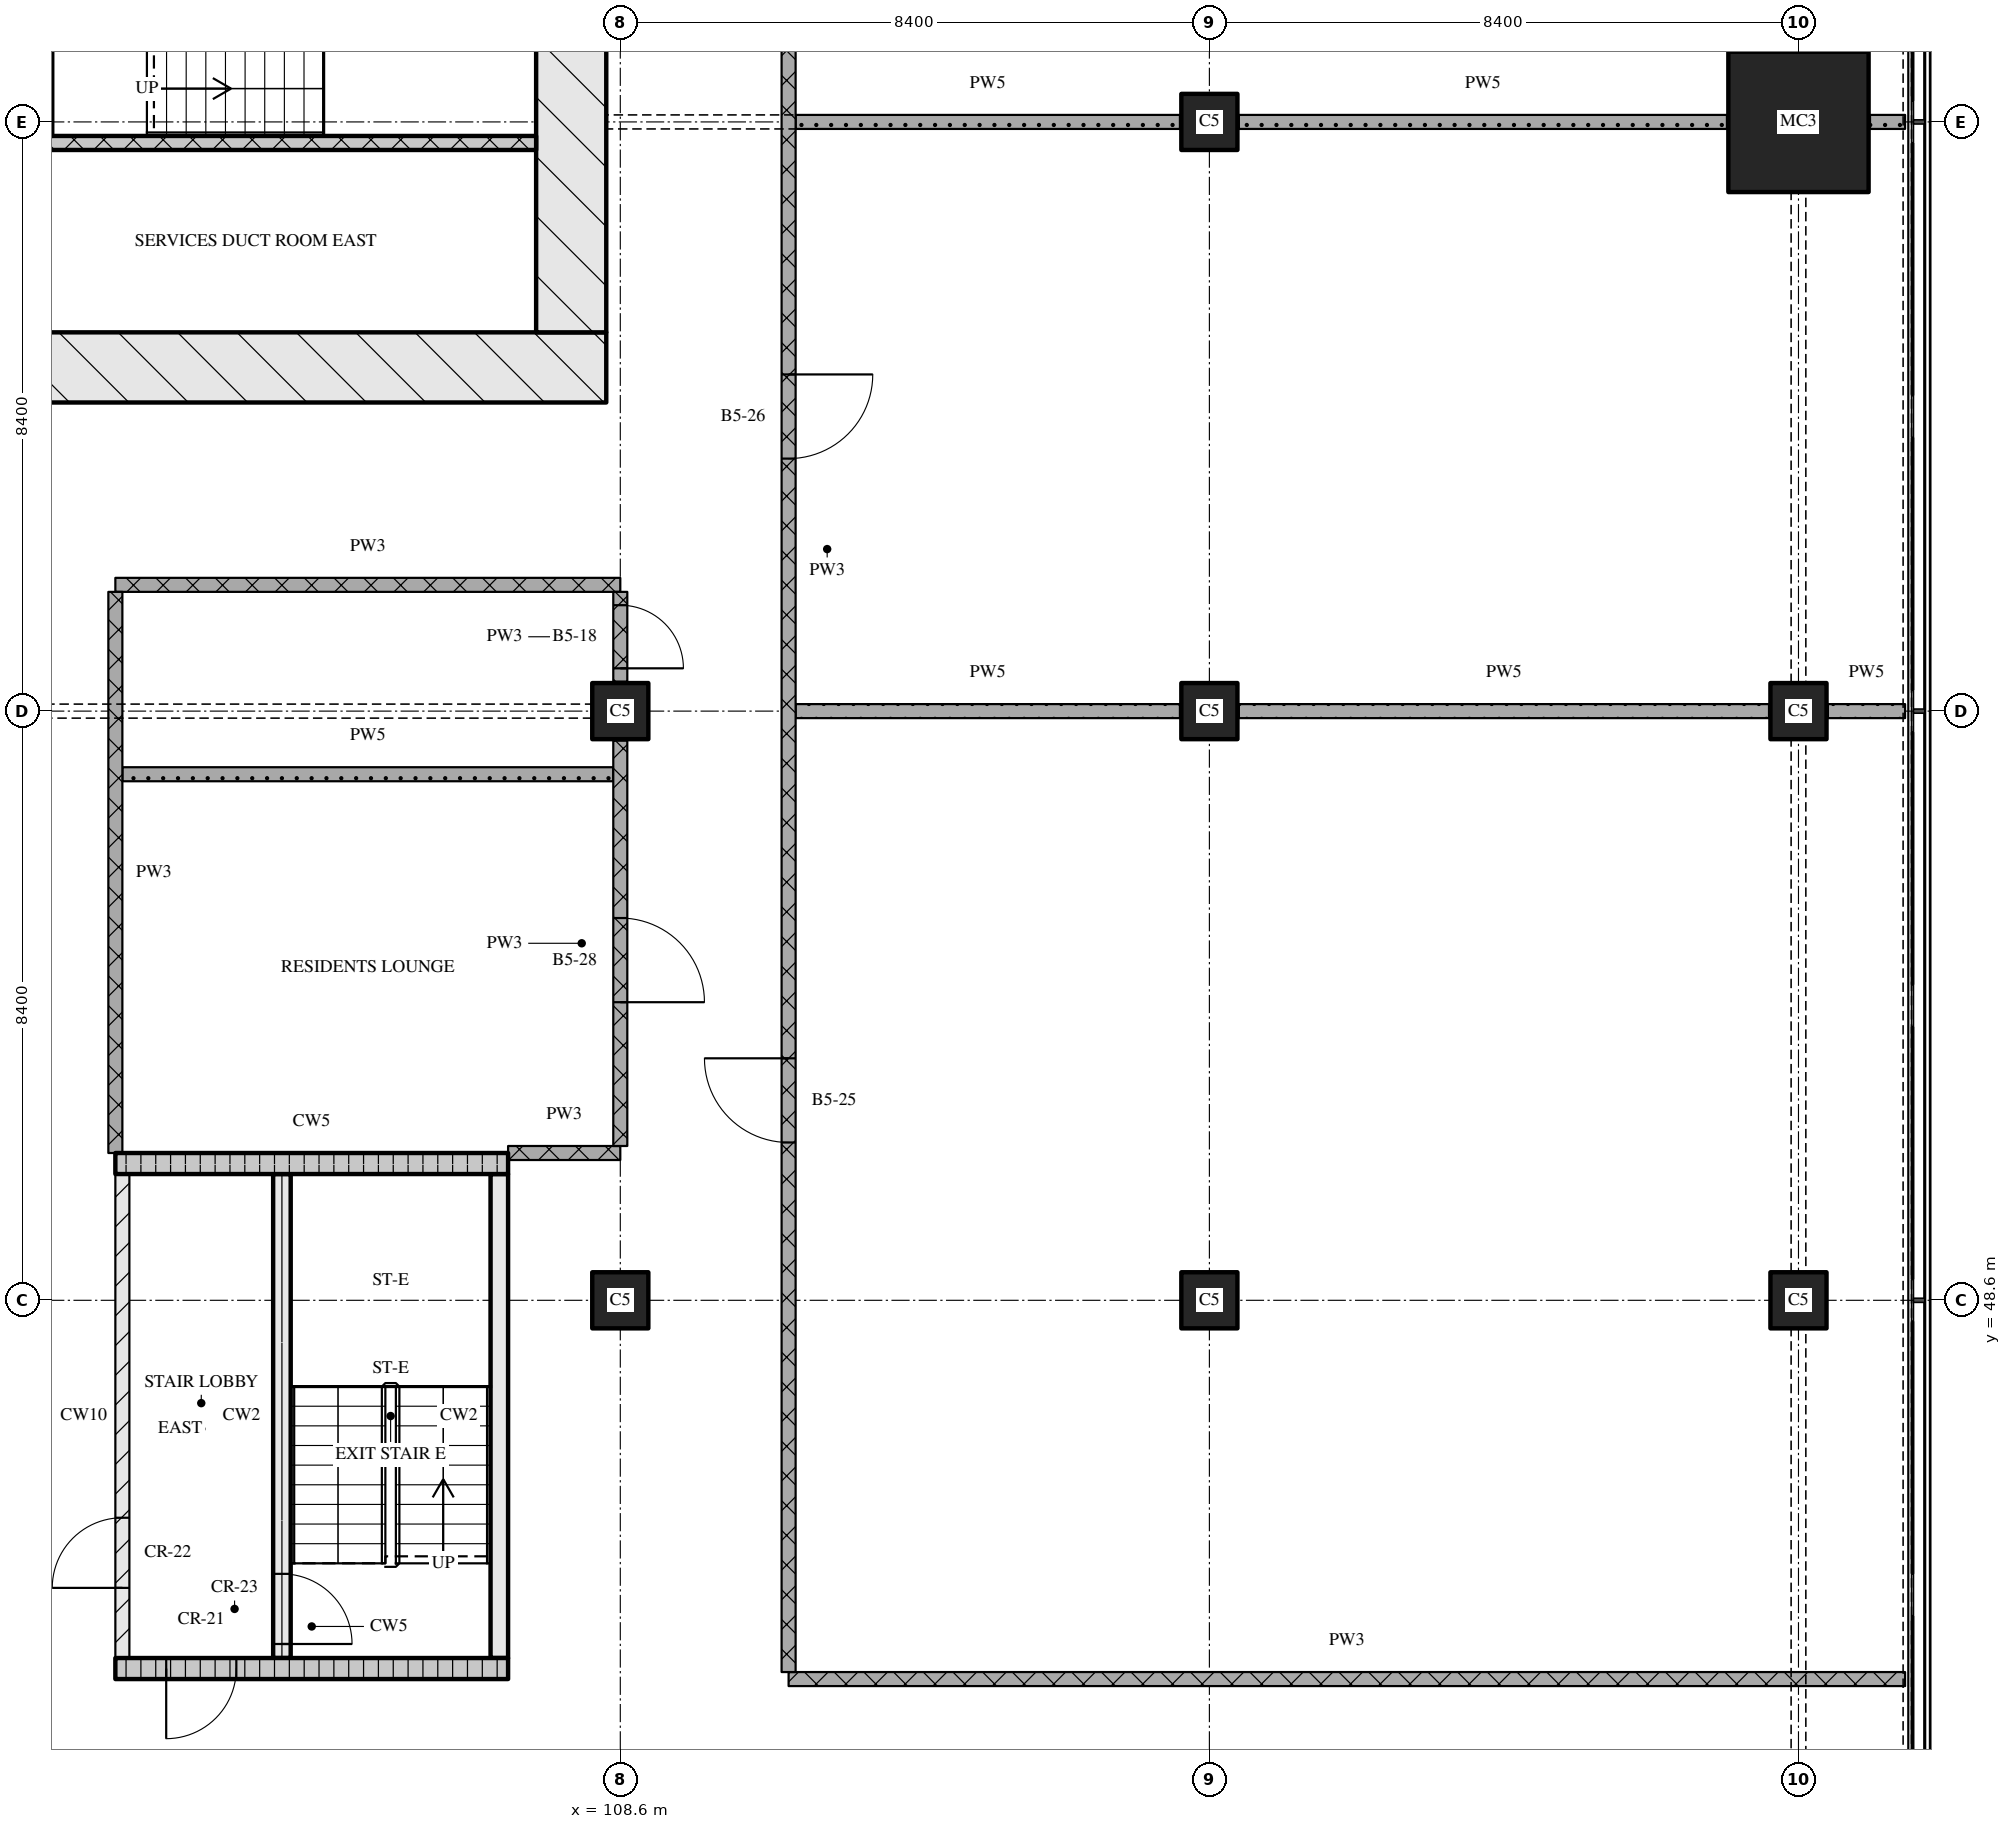
"""IFC4 building model, lengths in metres.
Left out: names, types, materials, properties, quantities, classifications, styles, units other than length and angle.
Written with IfcOpenShell. Run it as: python <this file> out.ifc"""

import sys

from ifc_helpers import new_model, si_unit, direction, frame, frame_2d, origin, origin_2d, place, context, subcontext, project, spatial, rectangle, extrude, element, fill, save


model = new_model("IFC4")
c1 = context("Model", 3, precision=1e-05, world=origin(), true_north=direction((0.0, 1.0)))
c2 = subcontext(c1, "Body", "Model", "MODEL_VIEW")
j1 = project(units=[si_unit("LENGTHUNIT", "METRE"), si_unit("PLANEANGLEUNIT", "RADIAN")], contexts=[c1])
p1 = place(None, origin())
s1 = spatial("IfcSite", under=j1, at=p1, CompositionType="ELEMENT")
p2 = place(p1, origin())
s2 = spatial("IfcBuilding", under=s1, at=p2, CompositionType="ELEMENT")
p3 = place(p2, frame((0.0, 0.0, 138.45)))
s3 = spatial("IfcBuildingStorey", under=s2, at=p3, CompositionType="ELEMENT", Elevation=138.45)
for number, where, z_axis, x_axis in (
    (1, (108.6, 48.6, 0.0), (0.0, 0.0, 1.0), (1.0, 0.0, 0.0)),
    (2, (108.6, 57.0, 0.0), (0.0, 0.0, 1.0), (1.0, 0.0, 0.0)),
    (3, (117.0, 48.6, 0.0), (0.0, 0.0, 1.0), (1.0, 0.0, 0.0)),
    (4, (117.0, 57.0, 0.0), (0.0, 0.0, 1.0), (1.0, 0.0, 0.0)),
    (5, (117.0, 65.4, 0.0), (0.0, 0.0, 1.0), (1.0, 0.0, 0.0)),
    (6, (125.4, 48.6, 0.0), (0.0, 0.0, 1.0), (1.0, 0.0, 0.0)),
    (7, (125.4, 57.0, 0.0), (0.0, 0.0, 1.0), (1.0, 0.0, 0.0)),
):
    element("IfcColumn", number, at=place(p3, frame(where, z_axis=z_axis, x_axis=x_axis)), inside=s3, PredefinedType="COLUMN", context=c2, shape_type="SweptSolid", body=[
        extrude(rectangle(XDim=0.8, YDim=0.8, at=origin_2d()), origin(), (0.0, 0.0, 1.0), 3.6),
    ])
p4 = place(p3, frame((125.4, 65.4, 0.0), z_axis=(0.0, 0.0, 1.0), x_axis=(1.0, 0.0, 0.0)))
e8 = element("IfcColumn", 8, at=p4, inside=s3, PredefinedType="COLUMN", context=c2, shape_type="SweptSolid", body=[
    extrude(rectangle(XDim=2.0, YDim=2.0, at=origin_2d()), origin(), (0.0, 0.0, 1.0), 3.6),
])
p5 = place(p3, frame((66.8, 61.9, 0.0), z_axis=(0.0, 0.0, 1.0), x_axis=(1.0, 0.0, 0.0)))
e9 = element("IfcWall", 9, at=p5, inside=s3, PredefinedType="SOLIDWALL", context=c2, shape_type="SweptSolid", body=[
    extrude(rectangle(XDim=41.6, YDim=1.0, at=frame_2d((20.8, 0.0))), origin(), (0.0, 0.0, 1.0), 3.3),
])
p6 = place(p5, frame((21.15, 0.0, 0.0)))
e10 = element("IfcOpeningElement", 10, at=p6, cuts=e9, PredefinedType="OPENING", context=c2, shape_type="SweptSolid", body=[
    extrude(rectangle(XDim=1.8, YDim=2.1, at=frame_2d((0.9, 1.05))), frame((0.0, 0.51, 0.0), z_axis=(0.0, -1.0, 0.0), x_axis=(1.0, 0.0, 0.0)), (0.0, 0.0, 1.0), 1.02),
])
p7 = place(p3, frame((107.9, 62.4, 0.0), z_axis=(0.0, 0.0, 1.0), x_axis=(0.0, 1.0, 0.0)))
e11 = element("IfcWall", 11, at=p7, inside=s3, PredefinedType="SOLIDWALL", context=c2, shape_type="SweptSolid", body=[
    extrude(rectangle(XDim=12.0, YDim=1.0, at=frame_2d((6.0, 0.0))), origin(), (0.0, 0.0, 1.0), 3.3),
])
p8 = place(p7, frame((6.45, 0.0, 0.0)))
e12 = element("IfcOpeningElement", 12, at=p8, cuts=e11, PredefinedType="OPENING", context=c2, shape_type="SweptSolid", body=[
    extrude(rectangle(XDim=1.2, YDim=2.1, at=frame_2d((0.6, 1.05))), frame((0.0, 0.51, 0.0), z_axis=(0.0, -1.0, 0.0), x_axis=(1.0, 0.0, 0.0)), (0.0, 0.0, 1.0), 1.02),
])
p9 = place(p3, frame((91.4, 65.1, 0.0), z_axis=(0.0, 0.0, 1.0), x_axis=(1.0, 0.0, 0.0)))
e13 = element("IfcWall", 13, at=p9, inside=s3, PredefinedType="SOLIDWALL", context=c2, shape_type="SweptSolid", body=[
    extrude(rectangle(XDim=16.0, YDim=0.2, at=frame_2d((8.0, 0.0))), origin(), (0.0, 0.0, 1.0), 3.3),
])
p10 = place(p9, frame((7.83, 0.0, 0.0)))
e14 = element("IfcOpeningElement", 14, at=p10, cuts=e13, PredefinedType="OPENING", context=c2, shape_type="SweptSolid", body=[
    extrude(rectangle(XDim=0.9, YDim=2.1, at=frame_2d((0.45, 1.05))), frame((0.0, 0.11, 0.0), z_axis=(0.0, -1.0, 0.0), x_axis=(1.0, 0.0, 0.0)), (0.0, 0.0, 1.0), 0.22),
])
p11 = place(p3, frame((100.35, 65.2, 0.0), z_axis=(0.0, 0.0, 1.0), x_axis=(0.0, 1.0, 0.0)))
e15 = element("IfcWall", 15, at=p11, inside=s3, PredefinedType="SOLIDWALL", context=c2, shape_type="SweptSolid", body=[
    extrude(rectangle(XDim=2.85, YDim=0.3, at=frame_2d((1.425, 0.0))), origin(), (0.0, 0.0, 1.0), 3.3),
])
p12 = place(p3, frame((101.4, 43.35, 0.0), z_axis=(0.0, 0.0, 1.0), x_axis=(1.0, 0.0, 0.0)))
e16 = element("IfcWall", 16, at=p12, inside=s3, PredefinedType="SOLIDWALL", context=c2, shape_type="SweptSolid", body=[
    extrude(rectangle(XDim=5.6, YDim=0.3, at=frame_2d((2.8, 0.0))), origin(), (0.0, 0.0, 1.0), 3.3),
])
p13 = place(p12, frame((0.725, 0.0, 0.0)))
e17 = element("IfcOpeningElement", 17, at=p13, cuts=e16, PredefinedType="OPENING", context=c2, shape_type="SweptSolid", body=[
    extrude(rectangle(XDim=1.0, YDim=2.1, at=frame_2d((0.5, 1.05))), frame((0.0, 0.16, 0.0), z_axis=(0.0, -1.0, 0.0), x_axis=(1.0, 0.0, 0.0)), (0.0, 0.0, 1.0), 0.32),
])
p14 = place(p3, frame((101.5, 43.5, 0.0), z_axis=(0.0, 0.0, 1.0), x_axis=(0.0, 1.0, 0.0)))
e18 = element("IfcWall", 18, at=p14, inside=s3, PredefinedType="PARTITIONING", context=c2, shape_type="SweptSolid", body=[
    extrude(rectangle(XDim=6.9, YDim=0.2, at=frame_2d((3.45, 0.0))), origin(), (0.0, 0.0, 1.0), 3.3),
])
p15 = place(p14, frame((1.0, 0.0, 0.0)))
e19 = element("IfcOpeningElement", 19, at=p15, cuts=e18, PredefinedType="OPENING", context=c2, shape_type="SweptSolid", body=[
    extrude(rectangle(XDim=1.0, YDim=2.1, at=frame_2d((0.5, 1.05))), frame((0.0, 0.11, 0.0), z_axis=(0.0, -1.0, 0.0), x_axis=(1.0, 0.0, 0.0)), (0.0, 0.0, 1.0), 0.22),
])
p16 = place(p3, frame((103.775, 43.5, 0.0), z_axis=(0.0, 0.0, 1.0), x_axis=(0.0, 1.0, 0.0)))
e20 = element("IfcWall", 20, at=p16, inside=s3, PredefinedType="SOLIDWALL", context=c2, shape_type="SweptSolid", body=[
    extrude(rectangle(XDim=6.9, YDim=0.25, at=frame_2d((3.45, 0.0))), origin(), (0.0, 0.0, 1.0), 3.3),
])
p17 = place(p16, frame((0.2, 0.0, 0.0)))
e21 = element("IfcOpeningElement", 21, at=p17, cuts=e20, PredefinedType="OPENING", context=c2, shape_type="SweptSolid", body=[
    extrude(rectangle(XDim=1.0, YDim=2.1, at=frame_2d((0.5, 1.05))), frame((0.0, 0.135, 0.0), z_axis=(0.0, -1.0, 0.0), x_axis=(1.0, 0.0, 0.0)), (0.0, 0.0, 1.0), 0.27),
])
p18 = place(p3, frame((106.875, 43.5, 0.0), z_axis=(0.0, 0.0, 1.0), x_axis=(0.0, 1.0, 0.0)))
e22 = element("IfcWall", 22, at=p18, inside=s3, PredefinedType="SOLIDWALL", context=c2, shape_type="SweptSolid", body=[
    extrude(rectangle(XDim=6.9, YDim=0.25, at=frame_2d((3.45, 0.0))), origin(), (0.0, 0.0, 1.0), 3.3),
])
p19 = place(p3, frame((101.4, 50.55, 0.0), z_axis=(0.0, 0.0, 1.0), x_axis=(1.0, 0.0, 0.0)))
e23 = element("IfcWall", 23, at=p19, inside=s3, PredefinedType="SOLIDWALL", context=c2, shape_type="SweptSolid", body=[
    extrude(rectangle(XDim=5.6, YDim=0.3, at=frame_2d((2.8, 0.0))), origin(), (0.0, 0.0, 1.0), 3.3),
])
p20 = place(p3, frame((111.0, 43.2, 0.0), z_axis=(0.0, 0.0, 1.0), x_axis=(1.0, 0.0, 0.0)))
e24 = element("IfcWall", 24, at=p20, inside=s3, PredefinedType="PARTITIONING", context=c2, shape_type="SweptSolid", body=[
    extrude(rectangle(XDim=15.92, YDim=0.2, at=frame_2d((7.96, 0.0))), origin(), (0.0, 0.0, 1.0), 3.3),
])
p21 = place(p3, frame((107.0, 50.7, 0.0), z_axis=(0.0, 0.0, 1.0), x_axis=(1.0, 0.0, 0.0)))
e25 = element("IfcWall", 25, at=p21, inside=s3, PredefinedType="PARTITIONING", context=c2, shape_type="SweptSolid", body=[
    extrude(rectangle(XDim=1.6, YDim=0.2, at=frame_2d((0.8, 0.0))), origin(), (0.0, 0.0, 1.0), 3.3),
])
p22 = place(p3, frame((101.5, 56.1, 0.0), z_axis=(0.0, 0.0, 1.0), x_axis=(1.0, 0.0, 0.0)))
e26 = element("IfcWall", 26, at=p22, inside=s3, PredefinedType="PARTITIONING", context=c2, shape_type="SweptSolid", body=[
    extrude(rectangle(XDim=7.0, YDim=0.2, at=frame_2d((3.5, 0.0))), origin(), (0.0, 0.0, 1.0), 3.3),
])
p23 = place(p3, frame((111.1, 57.0, 0.0), z_axis=(0.0, 0.0, 1.0), x_axis=(1.0, 0.0, 0.0)))
e27 = element("IfcWall", 27, at=p23, inside=s3, PredefinedType="PARTITIONING", context=c2, shape_type="SweptSolid", body=[
    extrude(rectangle(XDim=5.48, YDim=0.2, at=frame_2d((2.74, 0.0))), origin(), (0.0, 0.0, 1.0), 3.3),
])
p24 = place(p3, frame((117.42, 57.0, 0.0), z_axis=(0.0, 0.0, 1.0), x_axis=(1.0, 0.0, 0.0)))
e28 = element("IfcWall", 28, at=p24, inside=s3, PredefinedType="PARTITIONING", context=c2, shape_type="SweptSolid", body=[
    extrude(rectangle(XDim=7.56, YDim=0.2, at=frame_2d((3.78, 0.0))), origin(), (0.0, 0.0, 1.0), 3.3),
])
p25 = place(p3, frame((125.82, 57.0, 0.0), z_axis=(0.0, 0.0, 1.0), x_axis=(1.0, 0.0, 0.0)))
e29 = element("IfcWall", 29, at=p25, inside=s3, PredefinedType="PARTITIONING", context=c2, shape_type="SweptSolid", body=[
    extrude(rectangle(XDim=1.1, YDim=0.2, at=frame_2d((0.55, 0.0))), origin(), (0.0, 0.0, 1.0), 3.3),
])
p26 = place(p3, frame((101.4, 58.8, 0.0), z_axis=(0.0, 0.0, 1.0), x_axis=(1.0, 0.0, 0.0)))
e30 = element("IfcWall", 30, at=p26, inside=s3, PredefinedType="PARTITIONING", context=c2, shape_type="SweptSolid", body=[
    extrude(rectangle(XDim=7.2, YDim=0.2, at=frame_2d((3.6, 0.0))), origin(), (0.0, 0.0, 1.0), 3.3),
])
p27 = place(p3, frame((111.1, 65.4, 0.0), z_axis=(0.0, 0.0, 1.0), x_axis=(1.0, 0.0, 0.0)))
e31 = element("IfcWall", 31, at=p27, inside=s3, PredefinedType="PARTITIONING", context=c2, shape_type="SweptSolid", body=[
    extrude(rectangle(XDim=5.48, YDim=0.2, at=frame_2d((2.74, 0.0))), origin(), (0.0, 0.0, 1.0), 2.9),
])
p28 = place(p3, frame((117.42, 65.4, 0.0), z_axis=(0.0, 0.0, 1.0), x_axis=(1.0, 0.0, 0.0)))
e32 = element("IfcWall", 32, at=p28, inside=s3, PredefinedType="PARTITIONING", context=c2, shape_type="SweptSolid", body=[
    extrude(rectangle(XDim=6.96, YDim=0.2, at=frame_2d((3.48, 0.0))), origin(), (0.0, 0.0, 1.0), 3.3),
])
p29 = place(p3, frame((126.42, 65.4, 0.0), z_axis=(0.0, 0.0, 1.0), x_axis=(1.0, 0.0, 0.0)))
e33 = element("IfcWall", 33, at=p29, inside=s3, PredefinedType="PARTITIONING", context=c2, shape_type="SweptSolid", body=[
    extrude(rectangle(XDim=0.5, YDim=0.2, at=frame_2d((0.25, 0.0))), origin(), (0.0, 0.0, 1.0), 3.3),
])
p30 = place(p3, frame((101.4, 58.7, 0.0), z_axis=(0.0, 0.0, 1.0), x_axis=(0.0, -1.0, 0.0)))
e34 = element("IfcWall", 34, at=p30, inside=s3, PredefinedType="PARTITIONING", context=c2, shape_type="SweptSolid", body=[
    extrude(rectangle(XDim=8.0, YDim=0.2, at=frame_2d((4.0, 0.0))), origin(), (0.0, 0.0, 1.0), 3.3),
])
p31 = place(p3, frame((108.6, 50.8, 0.0), z_axis=(0.0, 0.0, 1.0), x_axis=(0.0, 1.0, 0.0)))
e35 = element("IfcWall", 35, at=p31, inside=s3, PredefinedType="PARTITIONING", context=c2, shape_type="SweptSolid", body=[
    extrude(rectangle(XDim=5.78, YDim=0.2, at=frame_2d((2.89, 0.0))), origin(), (0.0, 0.0, 1.0), 3.3),
])
p32 = place(p31, frame((2.05, 0.0, 0.0)))
e36 = element("IfcOpeningElement", 36, at=p32, cuts=e35, PredefinedType="OPENING", context=c2, shape_type="SweptSolid", body=[
    extrude(rectangle(XDim=1.2, YDim=2.1, at=frame_2d((0.6, 1.05))), frame((0.0, 0.11, 0.0), z_axis=(0.0, -1.0, 0.0), x_axis=(1.0, 0.0, 0.0)), (0.0, 0.0, 1.0), 0.22),
])
p33 = place(p3, frame((108.6, 57.42, 0.0), z_axis=(0.0, 0.0, 1.0), x_axis=(0.0, 1.0, 0.0)))
e37 = element("IfcWall", 37, at=p33, inside=s3, PredefinedType="PARTITIONING", context=c2, shape_type="SweptSolid", body=[
    extrude(rectangle(XDim=1.28, YDim=0.2, at=frame_2d((0.64, 0.0))), origin(), (0.0, 0.0, 1.0), 3.3),
])
p34 = place(p33, frame((0.19, 0.0, 0.0)))
e38 = element("IfcOpeningElement", 38, at=p34, cuts=e37, PredefinedType="OPENING", context=c2, shape_type="SweptSolid", body=[
    extrude(rectangle(XDim=0.9, YDim=2.1, at=frame_2d((0.45, 1.05))), frame((0.0, 0.11, 0.0), z_axis=(0.0, -1.0, 0.0), x_axis=(1.0, 0.0, 0.0)), (0.0, 0.0, 1.0), 0.22),
])
p35 = place(p3, frame((111.0, 75.32, 0.0), z_axis=(0.0, 0.0, 1.0), x_axis=(0.0, -1.0, 0.0)))
e39 = element("IfcWall", 39, at=p35, inside=s3, PredefinedType="PARTITIONING", context=c2, shape_type="SweptSolid", body=[
    extrude(rectangle(XDim=32.02, YDim=0.2, at=frame_2d((16.01, 0.0))), origin(), (0.0, 0.0, 1.0), 3.3),
])
p36 = place(p35, frame((4.579, 0.0, 0.0)))
e40 = element("IfcOpeningElement", 40, at=p36, cuts=e39, PredefinedType="OPENING", context=c2, shape_type="SweptSolid", body=[
    extrude(rectangle(XDim=1.2, YDim=2.1, at=frame_2d((0.6, 1.05))), frame((0.0, 0.11, 0.0), z_axis=(0.0, -1.0, 0.0), x_axis=(1.0, 0.0, 0.0)), (0.0, 0.0, 1.0), 0.22),
])
p37 = place(p35, frame((13.52, 0.0, 0.0)))
e41 = element("IfcOpeningElement", 41, at=p37, cuts=e39, PredefinedType="OPENING", context=c2, shape_type="SweptSolid", body=[
    extrude(rectangle(XDim=1.2, YDim=2.1, at=frame_2d((0.6, 1.05))), frame((0.0, 0.11, 0.0), z_axis=(0.0, -1.0, 0.0), x_axis=(1.0, 0.0, 0.0)), (0.0, 0.0, 1.0), 0.22),
])
p38 = place(p35, frame((23.27, 0.0, 0.0)))
e42 = element("IfcOpeningElement", 42, at=p38, cuts=e39, PredefinedType="OPENING", context=c2, shape_type="SweptSolid", body=[
    extrude(rectangle(XDim=1.2, YDim=2.1, at=frame_2d((0.6, 1.05))), frame((0.0, 0.11, 0.0), z_axis=(0.0, -1.0, 0.0), x_axis=(1.0, 0.0, 0.0)), (0.0, 0.0, 1.0), 0.22),
])
p39 = place(p13, origin())
e43 = element("IfcDoor", 43, at=p39, inside=s3, OperationType="SINGLE_SWING_RIGHT", PredefinedType="DOOR", context=c2, shape_type="SweptSolid", body=[
    extrude(rectangle(XDim=1.0, YDim=2.1, at=frame_2d((0.5, 1.05))), frame((0.0, 0.025, 0.0), z_axis=(0.0, -1.0, 0.0), x_axis=(1.0, 0.0, 0.0)), (0.0, 0.0, 1.0), 0.05),
])
fill(e17, e43)
p40 = place(p17, origin())
e44 = element("IfcDoor", 44, at=p40, inside=s3, OperationType="SINGLE_SWING_RIGHT", PredefinedType="DOOR", context=c2, shape_type="SweptSolid", body=[
    extrude(rectangle(XDim=1.0, YDim=2.1, at=frame_2d((0.5, 1.05))), frame((0.0, 0.025, 0.0), z_axis=(0.0, -1.0, 0.0), x_axis=(1.0, 0.0, 0.0)), (0.0, 0.0, 1.0), 0.05),
])
fill(e21, e44)
p41 = place(p15, origin())
e45 = element("IfcDoor", 45, at=p41, inside=s3, OperationType="SINGLE_SWING_LEFT", PredefinedType="DOOR", context=c2, shape_type="SweptSolid", body=[
    extrude(rectangle(XDim=1.0, YDim=2.1, at=frame_2d((0.5, 1.05))), frame((0.0, 0.025, 0.0), z_axis=(0.0, -1.0, 0.0), x_axis=(1.0, 0.0, 0.0)), (0.0, 0.0, 1.0), 0.05),
])
fill(e19, e45)
p42 = place(p32, origin())
e46 = element("IfcDoor", 46, at=p42, inside=s3, OperationType="SINGLE_SWING_RIGHT", PredefinedType="DOOR", context=c2, shape_type="SweptSolid", body=[
    extrude(rectangle(XDim=1.2, YDim=2.1, at=frame_2d((0.6, 1.05))), frame((0.0, 0.025, 0.0), z_axis=(0.0, -1.0, 0.0), x_axis=(1.0, 0.0, 0.0)), (0.0, 0.0, 1.0), 0.05),
])
fill(e36, e46)
p43 = place(p34, origin())
e47 = element("IfcDoor", 47, at=p43, inside=s3, OperationType="SINGLE_SWING_RIGHT", PredefinedType="DOOR", context=c2, shape_type="SweptSolid", body=[
    extrude(rectangle(XDim=0.9, YDim=2.1, at=frame_2d((0.45, 1.05))), frame((0.0, 0.025, 0.0), z_axis=(0.0, -1.0, 0.0), x_axis=(1.0, 0.0, 0.0)), (0.0, 0.0, 1.0), 0.05),
])
fill(e38, e47)
p44 = place(p37, origin())
e48 = element("IfcDoor", 48, at=p44, inside=s3, OperationType="SINGLE_SWING_LEFT", PredefinedType="DOOR", context=c2, shape_type="SweptSolid", body=[
    extrude(rectangle(XDim=1.2, YDim=2.1, at=frame_2d((0.6, 1.05))), frame((0.0, 0.025, 0.0), z_axis=(0.0, -1.0, 0.0), x_axis=(1.0, 0.0, 0.0)), (0.0, 0.0, 1.0), 0.05),
])
fill(e41, e48)
p45 = place(p38, origin())
e49 = element("IfcDoor", 49, at=p45, inside=s3, OperationType="SINGLE_SWING_RIGHT", PredefinedType="DOOR", context=c2, shape_type="SweptSolid", body=[
    extrude(rectangle(XDim=1.2, YDim=2.1, at=frame_2d((0.6, 1.05))), frame((0.0, 0.025, 0.0), z_axis=(0.0, -1.0, 0.0), x_axis=(1.0, 0.0, 0.0)), (0.0, 0.0, 1.0), 0.05),
])
fill(e42, e49)
save(model, sys.argv[1])
